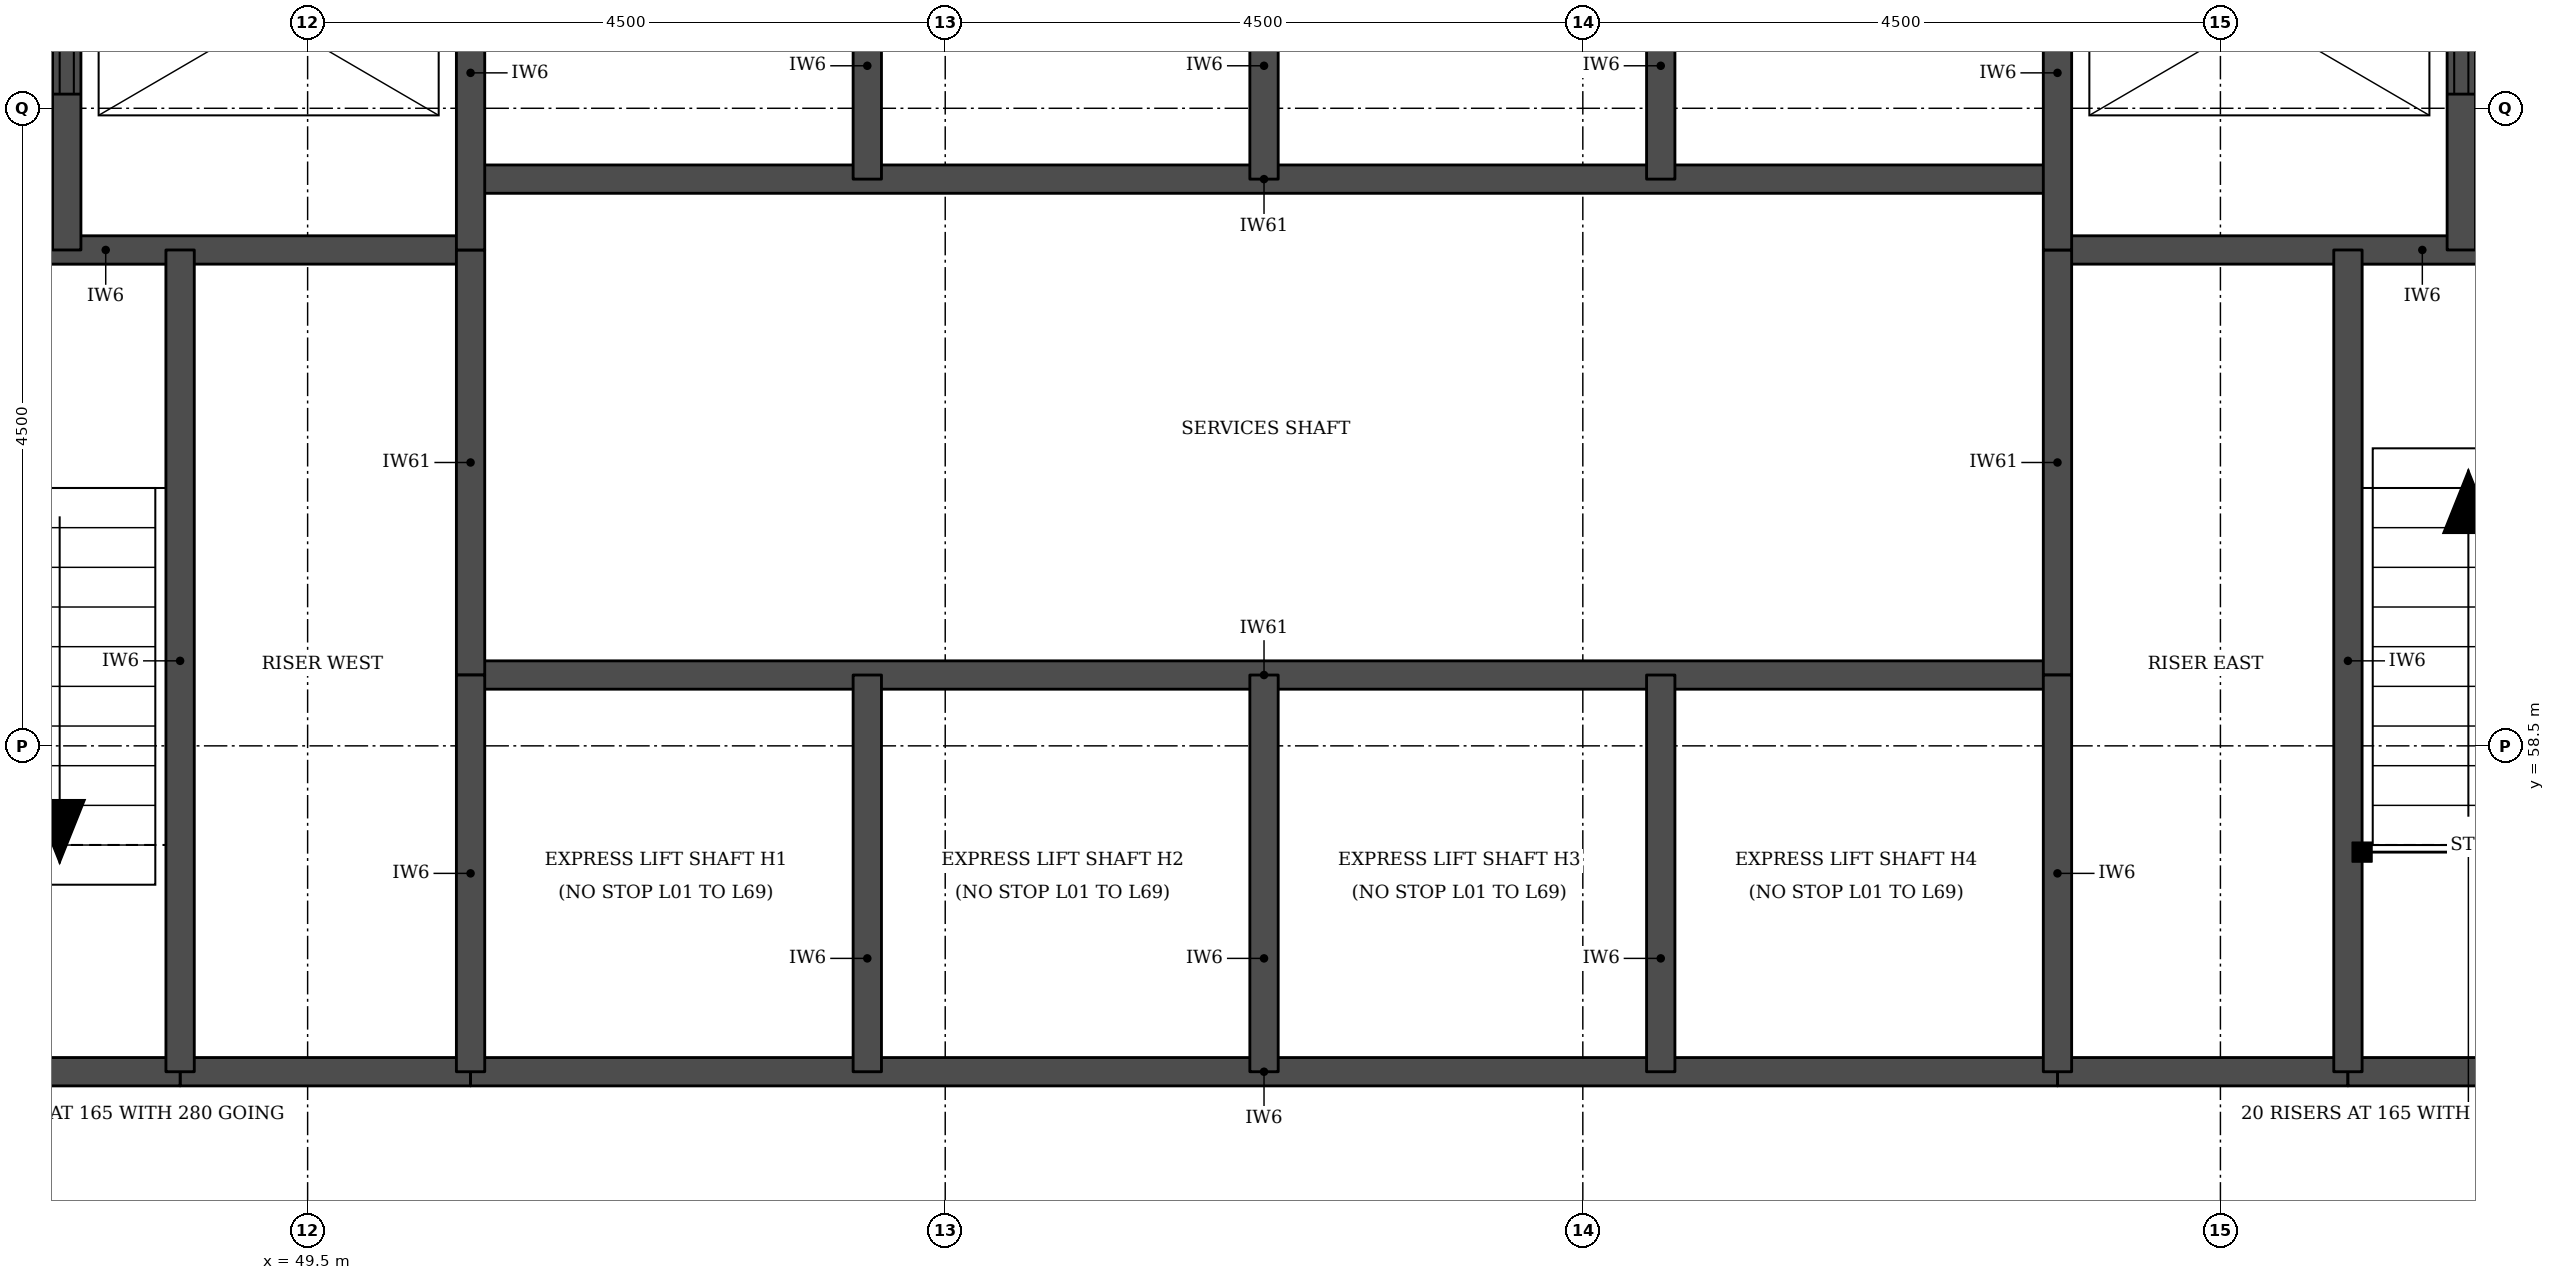
"""IFC4 building model, lengths in metres.
Left out: names, types, materials, properties, quantities, classifications, styles, units other than length and angle.
Written with IfcOpenShell. Run it as: python <this file> out.ifc"""

import sys

from ifc_helpers import new_model, si_unit, direction, frame, frame_2d, origin, place, context, subcontext, project, spatial, rectangle, extrude, element, fill, save


model = new_model("IFC4")
c1 = context("Model", 3, precision=1e-05, world=origin(), true_north=direction((0.0, 1.0)))
c2 = subcontext(c1, "Body", "Model", "MODEL_VIEW")
j1 = project(units=[si_unit("LENGTHUNIT", "METRE"), si_unit("PLANEANGLEUNIT", "RADIAN")], contexts=[c1])
p1 = place(None, origin())
s1 = spatial("IfcSite", under=j1, at=p1, CompositionType="ELEMENT")
p2 = place(p1, origin())
s2 = spatial("IfcBuilding", under=s1, at=p2, CompositionType="ELEMENT")
p3 = place(p2, frame((0.0, 0.0, 49.5)))
s3 = spatial("IfcBuildingStorey", under=s2, at=p3, CompositionType="ELEMENT", Elevation=49.5)
for number, where, z_axis, x_axis in (
    (1, (48.6, 56.2, 0.0), (0.0, 0.0, 1.0), (1.0, 0.0, 0.0)),
    (2, (61.85, 56.2, 0.0), (0.0, 0.0, 1.0), (1.0, 0.0, 0.0)),
):
    element("IfcWall", number, at=place(p3, frame(where, z_axis=z_axis, x_axis=x_axis)), inside=s3, PredefinedType="SOLIDWALL", context=c2, shape_type="SweptSolid", body=[
        extrude(rectangle(XDim=2.05, YDim=0.2, at=frame_2d((1.025, 0.0))), origin(), (0.0, 0.0, 1.0), 3.08),
    ])
p4 = place(p3, frame((45.5, 56.2, 0.0), z_axis=(0.0, 0.0, 1.0), x_axis=(1.0, 0.0, 0.0)))
e3 = element("IfcWall", 3, at=p4, inside=s3, PredefinedType="SOLIDWALL", context=c2, shape_type="SweptSolid", body=[
    extrude(rectangle(XDim=3.1, YDim=0.2, at=frame_2d((1.55, 0.0))), origin(), (0.0, 0.0, 1.0), 3.08),
])
p5 = place(p3, frame((50.65, 56.2, 0.0), z_axis=(0.0, 0.0, 1.0), x_axis=(1.0, 0.0, 0.0)))
e4 = element("IfcWall", 4, at=p5, inside=s3, PredefinedType="SOLIDWALL", context=c2, shape_type="SweptSolid", body=[
    extrude(rectangle(XDim=11.2, YDim=0.2, at=frame_2d((5.6, 0.0))), origin(), (0.0, 0.0, 1.0), 3.08),
])
p6 = place(p3, frame((63.9, 56.2, 0.0), z_axis=(0.0, 0.0, 1.0), x_axis=(1.0, 0.0, 0.0)))
e5 = element("IfcWall", 5, at=p6, inside=s3, PredefinedType="SOLIDWALL", context=c2, shape_type="SweptSolid", body=[
    extrude(rectangle(XDim=3.1, YDim=0.2, at=frame_2d((1.55, 0.0))), origin(), (0.0, 0.0, 1.0), 3.08),
])
p7 = place(p3, frame((50.65, 59.0, 0.0), z_axis=(0.0, 0.0, 1.0), x_axis=(1.0, 0.0, 0.0)))
e6 = element("IfcWall", 6, at=p7, inside=s3, PredefinedType="SOLIDWALL", context=c2, shape_type="SweptSolid", body=[
    extrude(rectangle(XDim=11.2, YDim=0.2, at=frame_2d((5.6, 0.0))), origin(), (0.0, 0.0, 1.0), 3.3),
])
for number, where, z_axis, x_axis in (
    (7, (45.5, 62.0, 0.0), (0.0, 0.0, 1.0), (1.0, 0.0, 0.0)),
    (8, (61.85, 62.0, 0.0), (0.0, 0.0, 1.0), (1.0, 0.0, 0.0)),
):
    element("IfcWall", number, at=place(p3, frame(where, z_axis=z_axis, x_axis=x_axis)), inside=s3, PredefinedType="SOLIDWALL", context=c2, shape_type="SweptSolid", body=[
        extrude(rectangle(XDim=5.15, YDim=0.2, at=frame_2d((2.575, 0.0))), origin(), (0.0, 0.0, 1.0), 3.08),
    ])
p8 = place(p3, frame((50.65, 62.5, 0.0), z_axis=(0.0, 0.0, 1.0), x_axis=(1.0, 0.0, 0.0)))
e9 = element("IfcWall", 9, at=p8, inside=s3, PredefinedType="SOLIDWALL", context=c2, shape_type="SweptSolid", body=[
    extrude(rectangle(XDim=11.2, YDim=0.2, at=frame_2d((5.6, 0.0))), origin(), (0.0, 0.0, 1.0), 3.3),
])
p9 = place(p3, frame((47.8, 62.0, 0.0), z_axis=(0.0, 0.0, 1.0), x_axis=(0.0, 1.0, 0.0)))
e10 = element("IfcWall", 10, at=p9, inside=s3, PredefinedType="SOLIDWALL", context=c2, shape_type="SweptSolid", body=[
    extrude(rectangle(XDim=3.3, YDim=0.2, at=frame_2d((1.65, 0.0))), origin(), (0.0, 0.0, 1.0), 3.08),
])
p10 = place(p9, frame((1.1, 0.0, 0.0)))
e11 = element("IfcOpeningElement", 11, at=p10, cuts=e10, PredefinedType="OPENING", context=c2, shape_type="SweptSolid", body=[
    extrude(rectangle(XDim=1.1, YDim=2.1, at=frame_2d((0.55, 1.05))), frame((0.0, 0.11, 0.0), z_axis=(0.0, -1.0, 0.0), x_axis=(1.0, 0.0, 0.0)), (0.0, 0.0, 1.0), 0.22),
])
p11 = place(p3, frame((48.6, 56.2, 0.0), z_axis=(0.0, 0.0, 1.0), x_axis=(0.0, 1.0, 0.0)))
e12 = element("IfcWall", 12, at=p11, inside=s3, PredefinedType="SOLIDWALL", context=c2, shape_type="SweptSolid", body=[
    extrude(rectangle(XDim=5.8, YDim=0.2, at=frame_2d((2.9, 0.0))), origin(), (0.0, 0.0, 1.0), 3.08),
])
p12 = place(p3, frame((50.65, 59.0, 0.0), z_axis=(0.0, 0.0, 1.0), x_axis=(0.0, 1.0, 0.0)))
e13 = element("IfcWall", 13, at=p12, inside=s3, PredefinedType="SOLIDWALL", context=c2, shape_type="SweptSolid", body=[
    extrude(rectangle(XDim=3.0, YDim=0.2, at=frame_2d((1.5, 0.0))), origin(), (0.0, 0.0, 1.0), 3.3),
])
p13 = place(p3, frame((50.65, 56.2, 0.0), z_axis=(0.0, 0.0, 1.0), x_axis=(0.0, 1.0, 0.0)))
e14 = element("IfcWall", 14, at=p13, inside=s3, PredefinedType="SOLIDWALL", context=c2, shape_type="SweptSolid", body=[
    extrude(rectangle(XDim=2.8, YDim=0.2, at=frame_2d((1.4, 0.0))), origin(), (0.0, 0.0, 1.0), 3.08),
])
p14 = place(p3, frame((50.65, 62.0, 0.0), z_axis=(0.0, 0.0, 1.0), x_axis=(0.0, 1.0, 0.0)))
e15 = element("IfcWall", 15, at=p14, inside=s3, PredefinedType="SOLIDWALL", context=c2, shape_type="SweptSolid", body=[
    extrude(rectangle(XDim=3.3, YDim=0.2, at=frame_2d((1.65, 0.0))), origin(), (0.0, 0.0, 1.0), 3.08),
])
for number, where, z_axis, x_axis in (
    (16, (53.45, 56.2, 0.0), (0.0, 0.0, 1.0), (0.0, 1.0, 0.0)),
    (17, (53.45, 62.5, 0.0), (0.0, 0.0, 1.0), (0.0, 1.0, 0.0)),
    (18, (56.25, 56.2, 0.0), (0.0, 0.0, 1.0), (0.0, 1.0, 0.0)),
    (19, (56.25, 62.5, 0.0), (0.0, 0.0, 1.0), (0.0, 1.0, 0.0)),
    (20, (59.05, 56.2, 0.0), (0.0, 0.0, 1.0), (0.0, 1.0, 0.0)),
    (21, (59.05, 62.5, 0.0), (0.0, 0.0, 1.0), (0.0, 1.0, 0.0)),
):
    element("IfcWall", number, at=place(p3, frame(where, z_axis=z_axis, x_axis=x_axis)), inside=s3, PredefinedType="SOLIDWALL", context=c2, shape_type="SweptSolid", body=[
        extrude(rectangle(XDim=2.8, YDim=0.2, at=frame_2d((1.4, 0.0))), origin(), (0.0, 0.0, 1.0), 3.08),
    ])
p15 = place(p3, frame((61.85, 59.0, 0.0), z_axis=(0.0, 0.0, 1.0), x_axis=(0.0, 1.0, 0.0)))
e22 = element("IfcWall", 22, at=p15, inside=s3, PredefinedType="SOLIDWALL", context=c2, shape_type="SweptSolid", body=[
    extrude(rectangle(XDim=3.0, YDim=0.2, at=frame_2d((1.5, 0.0))), origin(), (0.0, 0.0, 1.0), 3.3),
])
p16 = place(p3, frame((61.85, 56.2, 0.0), z_axis=(0.0, 0.0, 1.0), x_axis=(0.0, 1.0, 0.0)))
e23 = element("IfcWall", 23, at=p16, inside=s3, PredefinedType="SOLIDWALL", context=c2, shape_type="SweptSolid", body=[
    extrude(rectangle(XDim=2.8, YDim=0.2, at=frame_2d((1.4, 0.0))), origin(), (0.0, 0.0, 1.0), 3.08),
])
p17 = place(p3, frame((61.85, 62.0, 0.0), z_axis=(0.0, 0.0, 1.0), x_axis=(0.0, 1.0, 0.0)))
e24 = element("IfcWall", 24, at=p17, inside=s3, PredefinedType="SOLIDWALL", context=c2, shape_type="SweptSolid", body=[
    extrude(rectangle(XDim=3.3, YDim=0.2, at=frame_2d((1.65, 0.0))), origin(), (0.0, 0.0, 1.0), 3.08),
])
p18 = place(p3, frame((63.9, 56.2, 0.0), z_axis=(0.0, 0.0, 1.0), x_axis=(0.0, 1.0, 0.0)))
e25 = element("IfcWall", 25, at=p18, inside=s3, PredefinedType="SOLIDWALL", context=c2, shape_type="SweptSolid", body=[
    extrude(rectangle(XDim=5.8, YDim=0.2, at=frame_2d((2.9, 0.0))), origin(), (0.0, 0.0, 1.0), 3.08),
])
p19 = place(p3, frame((64.7, 62.0, 0.0), z_axis=(0.0, 0.0, 1.0), x_axis=(0.0, 1.0, 0.0)))
e26 = element("IfcWall", 26, at=p19, inside=s3, PredefinedType="SOLIDWALL", context=c2, shape_type="SweptSolid", body=[
    extrude(rectangle(XDim=3.3, YDim=0.2, at=frame_2d((1.65, 0.0))), origin(), (0.0, 0.0, 1.0), 3.08),
])
p20 = place(p19, frame((1.1, 0.0, 0.0)))
e27 = element("IfcOpeningElement", 27, at=p20, cuts=e26, PredefinedType="OPENING", context=c2, shape_type="SweptSolid", body=[
    extrude(rectangle(XDim=1.1, YDim=2.1, at=frame_2d((0.55, 1.05))), frame((0.0, 0.11, 0.0), z_axis=(0.0, -1.0, 0.0), x_axis=(1.0, 0.0, 0.0)), (0.0, 0.0, 1.0), 0.22),
])
p21 = place(p10, origin())
e28 = element("IfcDoor", 28, at=p21, inside=s3, OperationType="DOUBLE_DOOR_SLIDING", PredefinedType="DOOR", context=c2, shape_type="SweptSolid", body=[
    extrude(rectangle(XDim=1.1, YDim=2.1, at=frame_2d((0.55, 1.05))), frame((0.0, 0.025, 0.0), z_axis=(0.0, -1.0, 0.0), x_axis=(1.0, 0.0, 0.0)), (0.0, 0.0, 1.0), 0.05),
])
fill(e11, e28)
p22 = place(p20, origin())
e29 = element("IfcDoor", 29, at=p22, inside=s3, OperationType="DOUBLE_DOOR_SLIDING", PredefinedType="DOOR", context=c2, shape_type="SweptSolid", body=[
    extrude(rectangle(XDim=1.1, YDim=2.1, at=frame_2d((0.55, 1.05))), frame((0.0, 0.025, 0.0), z_axis=(0.0, -1.0, 0.0), x_axis=(1.0, 0.0, 0.0)), (0.0, 0.0, 1.0), 0.05),
])
fill(e27, e29)
save(model, sys.argv[1])
